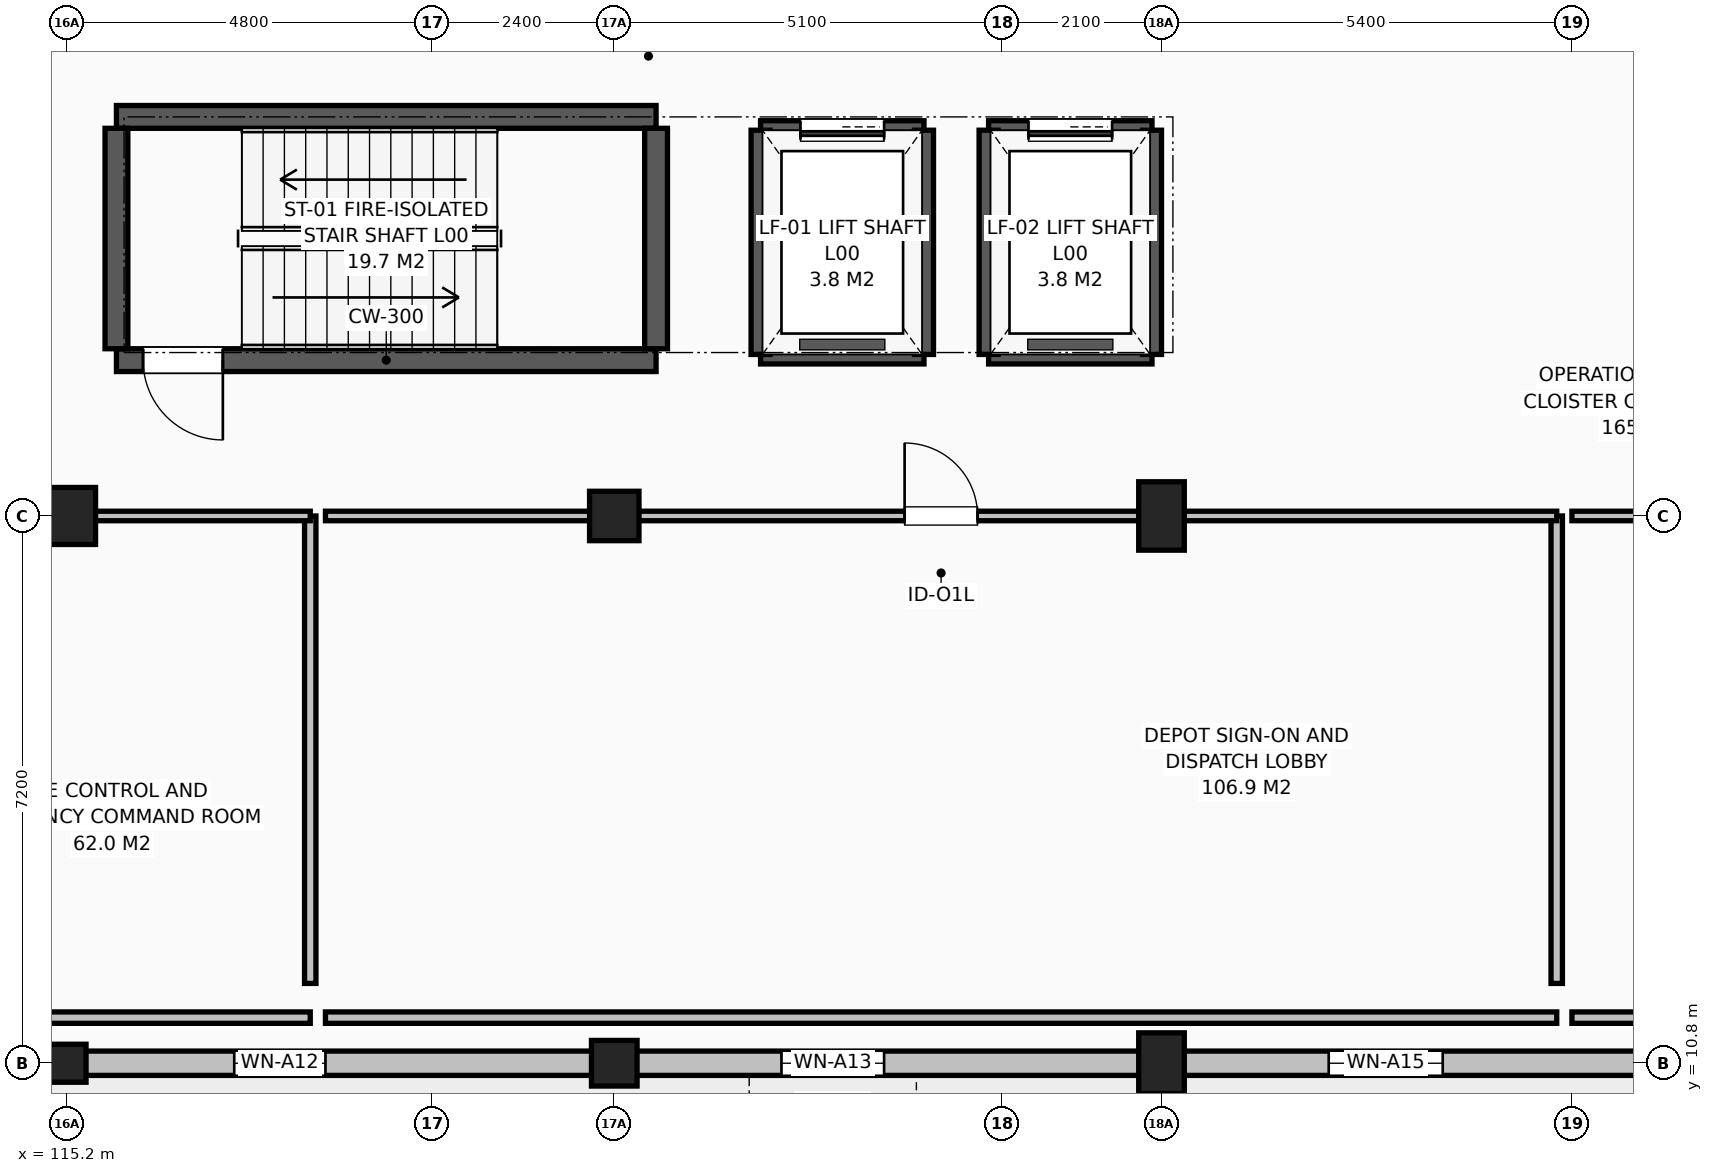
"""IFC4 building model, lengths in metres.
Left out: names, types, materials, properties, quantities, classifications, styles, units other than length and angle.
Written with IfcOpenShell. Run it as: python <this file> out.ifc"""

import sys

from ifc_helpers import new_model, si_unit, direction, frame, frame_2d, origin, origin_2d, place, context, subcontext, project, spatial, rectangle, circle, extrude, element, fill, save


model = new_model("IFC4")
c1 = context("Model", 3, precision=1e-05, world=origin(), true_north=direction((0.0, 1.0)))
c2 = subcontext(c1, "Body", "Model", "MODEL_VIEW")
j1 = project(units=[si_unit("LENGTHUNIT", "METRE"), si_unit("PLANEANGLEUNIT", "RADIAN")], contexts=[c1])
p1 = place(None, origin())
s1 = spatial("IfcSite", under=j1, at=p1, CompositionType="ELEMENT")
p2 = place(p1, origin())
s2 = spatial("IfcBuilding", under=s1, at=p2, CompositionType="ELEMENT")
p3 = place(p2, origin())
s3 = spatial("IfcBuildingStorey", under=s2, at=p3, CompositionType="ELEMENT", Elevation=0.0)
p4 = place(p3, frame((115.2, 10.8, 0.0), z_axis=(0.0, 0.0, 1.0), x_axis=(1.0, 0.0, 0.0)))
e1 = element("IfcColumn", 1, at=p4, inside=s3, PredefinedType="COLUMN", context=c2, shape_type="SweptSolid", body=[
    extrude(circle(Radius=0.25, at=origin_2d()), origin(), (0.0, 0.0, 1.0), 4.8),
])
p5 = place(p3, frame((115.2, 18.0, 0.0), z_axis=(0.0, 0.0, 1.0), x_axis=(1.0, 0.0, 0.0)))
e2 = element("IfcColumn", 2, at=p5, inside=s3, PredefinedType="COLUMN", context=c2, shape_type="SweptSolid", body=[
    extrude(circle(Radius=0.375, at=origin_2d()), origin(), (0.0, 0.0, 1.0), 4.8),
])
p6 = place(p3, frame((122.4, 10.8, 0.0), z_axis=(0.0, 0.0, 1.0), x_axis=(1.0, 0.0, 0.0)))
e3 = element("IfcColumn", 3, at=p6, inside=s3, PredefinedType="COLUMN", context=c2, shape_type="SweptSolid", body=[
    extrude(rectangle(XDim=0.6, YDim=0.6, at=origin_2d()), origin(), (0.0, 0.0, 1.0), 4.8),
])
p7 = place(p3, frame((122.4, 18.0, 0.0), z_axis=(0.0, 0.0, 1.0), x_axis=(1.0, 0.0, 0.0)))
e4 = element("IfcColumn", 4, at=p7, inside=s3, PredefinedType="COLUMN", context=c2, shape_type="SweptSolid", body=[
    extrude(rectangle(XDim=0.65, YDim=0.65, at=origin_2d()), origin(), (0.0, 0.0, 1.0), 4.8),
])
p8 = place(p3, frame((129.6, 10.8, 0.0), z_axis=(0.0, 0.0, 1.0), x_axis=(1.0, 0.0, 0.0)))
e5 = element("IfcColumn", 5, at=p8, inside=s3, PredefinedType="COLUMN", context=c2, shape_type="SweptSolid", body=[
    extrude(rectangle(XDim=0.6, YDim=0.8, at=origin_2d()), origin(), (0.0, 0.0, 1.0), 4.8),
])
p9 = place(p3, frame((129.6, 18.0, 0.0), z_axis=(0.0, 0.0, 1.0), x_axis=(1.0, 0.0, 0.0)))
e6 = element("IfcColumn", 6, at=p9, inside=s3, PredefinedType="COLUMN", context=c2, shape_type="SweptSolid", body=[
    extrude(rectangle(XDim=0.6, YDim=0.9, at=origin_2d()), origin(), (0.0, 0.0, 1.0), 4.8),
])
p10 = place(p3, frame((108.0, 10.8, 0.0), z_axis=(0.0, 0.0, 1.0), x_axis=(1.0, 0.0, 0.0)))
e7 = element("IfcWall", 7, at=p10, inside=s3, PredefinedType="SOLIDWALL", context=c2, shape_type="SweptSolid", body=[
    extrude(rectangle(XDim=79.2, YDim=0.32, at=frame_2d((39.6, 0.0))), origin(), (0.0, 0.0, 1.0), 4.25),
])
p11 = place(p10, frame((2.2, 0.0, 0.72)))
e8 = element("IfcOpeningElement", 8, at=p11, cuts=e7, PredefinedType="OPENING", context=c2, shape_type="SweptSolid", body=[
    extrude(rectangle(XDim=1.8, YDim=2.15, at=frame_2d((0.9, 1.075))), frame((0.0, 0.17, 0.0), z_axis=(0.0, -1.0, 0.0), x_axis=(1.0, 0.0, 0.0)), (0.0, 0.0, 1.0), 0.34),
])
p12 = place(p10, frame((9.4, 0.0, 0.72)))
e9 = element("IfcOpeningElement", 9, at=p12, cuts=e7, PredefinedType="OPENING", context=c2, shape_type="SweptSolid", body=[
    extrude(rectangle(XDim=1.2, YDim=2.0, at=frame_2d((0.6, 1.0))), frame((0.0, 0.17, 0.0), z_axis=(0.0, -1.0, 0.0), x_axis=(1.0, 0.0, 0.0)), (0.0, 0.0, 1.0), 0.34),
])
p13 = place(p10, frame((16.6, 0.0, 0.72)))
e10 = element("IfcOpeningElement", 10, at=p13, cuts=e7, PredefinedType="OPENING", context=c2, shape_type="SweptSolid", body=[
    extrude(rectangle(XDim=1.35, YDim=2.05, at=frame_2d((0.675, 1.025))), frame((0.0, 0.17, 0.0), z_axis=(0.0, -1.0, 0.0), x_axis=(1.0, 0.0, 0.0)), (0.0, 0.0, 1.0), 0.34),
])
p14 = place(p10, frame((23.8, 0.0, 0.72)))
e11 = element("IfcOpeningElement", 11, at=p14, cuts=e7, PredefinedType="OPENING", context=c2, shape_type="SweptSolid", body=[
    extrude(rectangle(XDim=1.5, YDim=2.1, at=frame_2d((0.75, 1.05))), frame((0.0, 0.17, 0.0), z_axis=(0.0, -1.0, 0.0), x_axis=(1.0, 0.0, 0.0)), (0.0, 0.0, 1.0), 0.34),
])
p15 = place(p10, frame((31.0, 0.0, 0.72)))
e12 = element("IfcOpeningElement", 12, at=p15, cuts=e7, PredefinedType="OPENING", context=c2, shape_type="SweptSolid", body=[
    extrude(rectangle(XDim=1.65, YDim=2.1, at=frame_2d((0.825, 1.05))), frame((0.0, 0.17, 0.0), z_axis=(0.0, -1.0, 0.0), x_axis=(1.0, 0.0, 0.0)), (0.0, 0.0, 1.0), 0.34),
])
p16 = place(p10, frame((38.2, 0.0, 0.72)))
e13 = element("IfcOpeningElement", 13, at=p16, cuts=e7, PredefinedType="OPENING", context=c2, shape_type="SweptSolid", body=[
    extrude(rectangle(XDim=1.8, YDim=2.15, at=frame_2d((0.9, 1.075))), frame((0.0, 0.17, 0.0), z_axis=(0.0, -1.0, 0.0), x_axis=(1.0, 0.0, 0.0)), (0.0, 0.0, 1.0), 0.34),
])
p17 = place(p10, frame((45.4, 0.0, 0.72)))
e14 = element("IfcOpeningElement", 14, at=p17, cuts=e7, PredefinedType="OPENING", context=c2, shape_type="SweptSolid", body=[
    extrude(rectangle(XDim=1.2, YDim=2.0, at=frame_2d((0.6, 1.0))), frame((0.0, 0.17, 0.0), z_axis=(0.0, -1.0, 0.0), x_axis=(1.0, 0.0, 0.0)), (0.0, 0.0, 1.0), 0.34),
])
p18 = place(p10, frame((52.6, 0.0, 0.72)))
e15 = element("IfcOpeningElement", 15, at=p18, cuts=e7, PredefinedType="OPENING", context=c2, shape_type="SweptSolid", body=[
    extrude(rectangle(XDim=1.35, YDim=2.05, at=frame_2d((0.675, 1.025))), frame((0.0, 0.17, 0.0), z_axis=(0.0, -1.0, 0.0), x_axis=(1.0, 0.0, 0.0)), (0.0, 0.0, 1.0), 0.34),
])
p19 = place(p10, frame((59.8, 0.0, 0.72)))
e16 = element("IfcOpeningElement", 16, at=p19, cuts=e7, PredefinedType="OPENING", context=c2, shape_type="SweptSolid", body=[
    extrude(rectangle(XDim=1.5, YDim=2.1, at=frame_2d((0.75, 1.05))), frame((0.0, 0.17, 0.0), z_axis=(0.0, -1.0, 0.0), x_axis=(1.0, 0.0, 0.0)), (0.0, 0.0, 1.0), 0.34),
])
p20 = place(p10, frame((67.0, 0.0, 0.72)))
e17 = element("IfcOpeningElement", 17, at=p20, cuts=e7, PredefinedType="OPENING", context=c2, shape_type="SweptSolid", body=[
    extrude(rectangle(XDim=1.65, YDim=2.1, at=frame_2d((0.825, 1.05))), frame((0.0, 0.17, 0.0), z_axis=(0.0, -1.0, 0.0), x_axis=(1.0, 0.0, 0.0)), (0.0, 0.0, 1.0), 0.34),
])
p21 = place(p3, frame((115.85, 20.05, 0.0), z_axis=(0.0, 0.0, 1.0), x_axis=(1.0, 0.0, 0.0)))
e18 = element("IfcWall", 18, at=p21, inside=s3, PredefinedType="SHEAR", context=c2, shape_type="SweptSolid", body=[
    extrude(rectangle(XDim=7.1, YDim=0.3, at=frame_2d((3.55, 0.0))), origin(), (0.0, 0.0, 1.0), 4.525),
])
p22 = place(p21, frame((0.35, 0.0, 0.0)))
e19 = element("IfcOpeningElement", 19, at=p22, cuts=e18, PredefinedType="OPENING", context=c2, shape_type="SweptSolid", body=[
    extrude(rectangle(XDim=1.05, YDim=2.15, at=frame_2d((0.525, 1.075))), frame((0.0, 0.16, 0.0), z_axis=(0.0, -1.0, 0.0), x_axis=(1.0, 0.0, 0.0)), (0.0, 0.0, 1.0), 0.32),
])
p23 = place(p3, frame((122.95, 23.25, 0.0), z_axis=(0.0, 0.0, 1.0), x_axis=(-1.0, 0.0, 0.0)))
e20 = element("IfcWall", 20, at=p23, inside=s3, PredefinedType="SHEAR", context=c2, shape_type="SweptSolid", body=[
    extrude(rectangle(XDim=7.1, YDim=0.3, at=frame_2d((3.55, 0.0))), origin(), (0.0, 0.0, 1.0), 4.525),
])
for number, where, z_axis, x_axis in (
    (21, (122.95, 20.2, 0.0), (0.0, 0.0, 1.0), (0.0, 1.0, 0.0)),
    (22, (115.85, 23.1, 0.0), (0.0, 0.0, 1.0), (0.0, -1.0, 0.0)),
):
    element("IfcWall", number, at=place(p3, frame(where, z_axis=z_axis, x_axis=x_axis)), inside=s3, PredefinedType="SHEAR", context=c2, shape_type="SweptSolid", body=[
        extrude(rectangle(XDim=2.9, YDim=0.3, at=frame_2d((1.45, 0.0))), origin(), (0.0, 0.0, 1.0), 4.525),
    ])
p24 = place(p3, frame((124.325, 20.125, 0.0), z_axis=(0.0, 0.0, 1.0), x_axis=(1.0, 0.0, 0.0)))
e23 = element("IfcWall", 23, at=p24, inside=s3, PredefinedType="SHEAR", context=c2, shape_type="SweptSolid", body=[
    extrude(rectangle(XDim=2.15, YDim=0.25, at=frame_2d((1.075, 0.0))), origin(), (0.0, 0.0, 1.0), 4.5),
])
p25 = place(p3, frame((126.475, 23.075, 0.0), z_axis=(0.0, 0.0, 1.0), x_axis=(-1.0, 0.0, 0.0)))
e24 = element("IfcWall", 24, at=p25, inside=s3, PredefinedType="SHEAR", context=c2, shape_type="SweptSolid", body=[
    extrude(rectangle(XDim=2.15, YDim=0.25, at=frame_2d((1.075, 0.0))), origin(), (0.0, 0.0, 1.0), 4.5),
])
p26 = place(p25, frame((0.525, 0.0, 0.0)))
e25 = element("IfcOpeningElement", 25, at=p26, cuts=e24, PredefinedType="OPENING", context=c2, shape_type="SweptSolid", body=[
    extrude(rectangle(XDim=1.1, YDim=2.15, at=frame_2d((0.55, 1.075))), frame((0.0, 0.135, 0.0), z_axis=(0.0, -1.0, 0.0), x_axis=(1.0, 0.0, 0.0)), (0.0, 0.0, 1.0), 0.27),
])
for number, where, z_axis, x_axis in (
    (26, (124.325, 23.075, 0.0), (0.0, 0.0, 1.0), (0.0, -1.0, 0.0)),
    (27, (126.475, 20.125, 0.0), (0.0, 0.0, 1.0), (0.0, 1.0, 0.0)),
):
    element("IfcWall", number, at=place(p3, frame(where, z_axis=z_axis, x_axis=x_axis)), inside=s3, PredefinedType="SHEAR", context=c2, shape_type="SweptSolid", body=[
        extrude(rectangle(XDim=2.95, YDim=0.25, at=frame_2d((1.475, 0.0))), origin(), (0.0, 0.0, 1.0), 4.5),
    ])
p27 = place(p3, frame((127.325, 20.125, 0.0), z_axis=(0.0, 0.0, 1.0), x_axis=(1.0, 0.0, 0.0)))
e28 = element("IfcWall", 28, at=p27, inside=s3, PredefinedType="SHEAR", context=c2, shape_type="SweptSolid", body=[
    extrude(rectangle(XDim=2.15, YDim=0.25, at=frame_2d((1.075, 0.0))), origin(), (0.0, 0.0, 1.0), 4.5),
])
p28 = place(p3, frame((129.475, 23.075, 0.0), z_axis=(0.0, 0.0, 1.0), x_axis=(-1.0, 0.0, 0.0)))
e29 = element("IfcWall", 29, at=p28, inside=s3, PredefinedType="SHEAR", context=c2, shape_type="SweptSolid", body=[
    extrude(rectangle(XDim=2.15, YDim=0.25, at=frame_2d((1.075, 0.0))), origin(), (0.0, 0.0, 1.0), 4.5),
])
p29 = place(p28, frame((0.525, 0.0, 0.0)))
e30 = element("IfcOpeningElement", 30, at=p29, cuts=e29, PredefinedType="OPENING", context=c2, shape_type="SweptSolid", body=[
    extrude(rectangle(XDim=1.1, YDim=2.15, at=frame_2d((0.55, 1.075))), frame((0.0, 0.135, 0.0), z_axis=(0.0, -1.0, 0.0), x_axis=(1.0, 0.0, 0.0)), (0.0, 0.0, 1.0), 0.27),
])
for number, where, z_axis, x_axis in (
    (31, (127.325, 23.075, 0.0), (0.0, 0.0, 1.0), (0.0, -1.0, 0.0)),
    (32, (129.475, 20.125, 0.0), (0.0, 0.0, 1.0), (0.0, 1.0, 0.0)),
):
    element("IfcWall", number, at=place(p3, frame(where, z_axis=z_axis, x_axis=x_axis)), inside=s3, PredefinedType="SHEAR", context=c2, shape_type="SweptSolid", body=[
        extrude(rectangle(XDim=2.95, YDim=0.25, at=frame_2d((1.475, 0.0))), origin(), (0.0, 0.0, 1.0), 4.5),
    ])
p30 = place(p3, frame((118.4, 11.4, 0.0), z_axis=(0.0, 0.0, 1.0), x_axis=(-1.0, 0.0, 0.0)))
e33 = element("IfcWall", 33, at=p30, inside=s3, PredefinedType="PARTITIONING", context=c2, shape_type="SweptSolid", body=[
    extrude(rectangle(XDim=9.4, YDim=0.15, at=frame_2d((4.7, 0.0))), origin(), (0.0, 0.0, 1.0), 3.857),
])
p31 = place(p3, frame((118.4, 11.85, 0.0), z_axis=(0.0, 0.0, 1.0), x_axis=(0.0, 1.0, 0.0)))
e34 = element("IfcWall", 34, at=p31, inside=s3, PredefinedType="PARTITIONING", context=c2, shape_type="SweptSolid", body=[
    extrude(rectangle(XDim=6.15, YDim=0.15, at=frame_2d((3.075, 0.0))), origin(), (0.0, 0.0, 1.0), 3.857),
])
p32 = place(p3, frame((109.0, 18.0, 0.0), z_axis=(0.0, 0.0, 1.0), x_axis=(1.0, 0.0, 0.0)))
e35 = element("IfcWall", 35, at=p32, inside=s3, PredefinedType="PARTITIONING", context=c2, shape_type="SweptSolid", body=[
    extrude(rectangle(XDim=9.4, YDim=0.125, at=frame_2d((4.7, 0.0))), origin(), (0.0, 0.0, 1.0), 3.857),
])
p33 = place(p32, frame((4.215, 0.0, 0.0)))
e36 = element("IfcOpeningElement", 36, at=p33, cuts=e35, PredefinedType="OPENING", context=c2, shape_type="SweptSolid", body=[
    extrude(rectangle(XDim=0.97, YDim=2.15, at=frame_2d((0.485, 1.075))), frame((0.0, 0.073, 0.0), z_axis=(0.0, -1.0, 0.0), x_axis=(1.0, 0.0, 0.0)), (0.0, 0.0, 1.0), 0.145),
])
p34 = place(p3, frame((134.8, 11.4, 0.0), z_axis=(0.0, 0.0, 1.0), x_axis=(-1.0, 0.0, 0.0)))
e37 = element("IfcWall", 37, at=p34, inside=s3, PredefinedType="PARTITIONING", context=c2, shape_type="SweptSolid", body=[
    extrude(rectangle(XDim=16.2, YDim=0.15, at=frame_2d((8.1, 0.0))), origin(), (0.0, 0.0, 1.0), 3.557),
])
p35 = place(p3, frame((134.8, 11.85, 0.0), z_axis=(0.0, 0.0, 1.0), x_axis=(0.0, 1.0, 0.0)))
e38 = element("IfcWall", 38, at=p35, inside=s3, PredefinedType="PARTITIONING", context=c2, shape_type="SweptSolid", body=[
    extrude(rectangle(XDim=6.15, YDim=0.15, at=frame_2d((3.075, 0.0))), origin(), (0.0, 0.0, 1.0), 3.757),
])
p36 = place(p3, frame((118.6, 18.0, 0.0), z_axis=(0.0, 0.0, 1.0), x_axis=(1.0, 0.0, 0.0)))
e39 = element("IfcWall", 39, at=p36, inside=s3, PredefinedType="PARTITIONING", context=c2, shape_type="SweptSolid", body=[
    extrude(rectangle(XDim=16.2, YDim=0.125, at=frame_2d((8.1, 0.0))), origin(), (0.0, 0.0, 1.0), 3.757),
])
p37 = place(p36, frame((7.62, 0.0, 0.0)))
e40 = element("IfcOpeningElement", 40, at=p37, cuts=e39, PredefinedType="OPENING", context=c2, shape_type="SweptSolid", body=[
    extrude(rectangle(XDim=0.96, YDim=2.15, at=frame_2d((0.48, 1.075))), frame((0.0, 0.073, 0.0), z_axis=(0.0, -1.0, 0.0), x_axis=(1.0, 0.0, 0.0)), (0.0, 0.0, 1.0), 0.145),
])
p38 = place(p3, frame((154.0, 11.4, 0.0), z_axis=(0.0, 0.0, 1.0), x_axis=(-1.0, 0.0, 0.0)))
e41 = element("IfcWall", 41, at=p38, inside=s3, PredefinedType="PARTITIONING", context=c2, shape_type="SweptSolid", body=[
    extrude(rectangle(XDim=19.0, YDim=0.15, at=frame_2d((9.5, 0.0))), origin(), (0.0, 0.0, 1.0), 3.857),
])
p39 = place(p3, frame((135.0, 18.0, 0.0), z_axis=(0.0, 0.0, 1.0), x_axis=(1.0, 0.0, 0.0)))
e42 = element("IfcWall", 42, at=p39, inside=s3, PredefinedType="PARTITIONING", context=c2, shape_type="SweptSolid", body=[
    extrude(rectangle(XDim=19.0, YDim=0.125, at=frame_2d((9.5, 0.0))), origin(), (0.0, 0.0, 1.0), 3.657),
])
p40 = place(p39, frame((5.16, 0.0, 0.0)))
e43 = element("IfcOpeningElement", 43, at=p40, cuts=e42, PredefinedType="OPENING", context=c2, shape_type="SweptSolid", body=[
    extrude(rectangle(XDim=1.8, YDim=2.2, at=frame_2d((0.9, 1.1))), frame((0.0, 0.073, 0.0), z_axis=(0.0, -1.0, 0.0), x_axis=(1.0, 0.0, 0.0)), (0.0, 0.0, 1.0), 0.145),
])
p41 = place(p12, origin())
e44 = element("IfcWindow", 44, at=p41, inside=s3, PartitioningType="SINGLE_PANEL", PredefinedType="WINDOW", context=c2, shape_type="SweptSolid", body=[
    extrude(rectangle(XDim=1.2, YDim=2.0, at=frame_2d((0.6, 1.0))), frame((0.0, 0.03, 0.0), z_axis=(0.0, -1.0, 0.0), x_axis=(1.0, 0.0, 0.0)), (0.0, 0.0, 1.0), 0.06),
])
fill(e9, e44)
p42 = place(p13, origin())
e45 = element("IfcWindow", 45, at=p42, inside=s3, PartitioningType="SINGLE_PANEL", PredefinedType="WINDOW", context=c2, shape_type="SweptSolid", body=[
    extrude(rectangle(XDim=1.35, YDim=2.05, at=frame_2d((0.675, 1.025))), frame((0.0, 0.03, 0.0), z_axis=(0.0, -1.0, 0.0), x_axis=(1.0, 0.0, 0.0)), (0.0, 0.0, 1.0), 0.06),
])
fill(e10, e45)
p43 = place(p14, origin())
e46 = element("IfcWindow", 46, at=p43, inside=s3, PartitioningType="SINGLE_PANEL", PredefinedType="WINDOW", context=c2, shape_type="SweptSolid", body=[
    extrude(rectangle(XDim=1.5, YDim=2.1, at=frame_2d((0.75, 1.05))), frame((0.0, 0.03, 0.0), z_axis=(0.0, -1.0, 0.0), x_axis=(1.0, 0.0, 0.0)), (0.0, 0.0, 1.0), 0.06),
])
fill(e11, e46)
p44 = place(p22, frame((1.05, 0.0, 0.0), z_axis=(0.0, 0.0, 1.0), x_axis=(-1.0, 0.0, 0.0)))
e47 = element("IfcDoor", 47, at=p44, inside=s3, OperationType="SINGLE_SWING_LEFT", PredefinedType="DOOR", context=c2, shape_type="SweptSolid", body=[
    extrude(rectangle(XDim=1.05, YDim=2.15, at=frame_2d((0.525, 1.075))), frame((0.0, 0.025, 0.0), z_axis=(0.0, -1.0, 0.0), x_axis=(1.0, 0.0, 0.0)), (0.0, 0.0, 1.0), 0.05),
])
fill(e19, e47)
p45 = place(p26, origin())
e48 = element("IfcDoor", 48, at=p45, inside=s3, OperationType="SLIDING_TO_LEFT", PredefinedType="DOOR", context=c2, shape_type="SweptSolid", body=[
    extrude(rectangle(XDim=1.1, YDim=2.15, at=frame_2d((0.55, 1.075))), frame((0.0, 0.025, 0.0), z_axis=(0.0, -1.0, 0.0), x_axis=(1.0, 0.0, 0.0)), (0.0, 0.0, 1.0), 0.05),
])
fill(e25, e48)
p46 = place(p29, origin())
e49 = element("IfcDoor", 49, at=p46, inside=s3, OperationType="SLIDING_TO_LEFT", PredefinedType="DOOR", context=c2, shape_type="SweptSolid", body=[
    extrude(rectangle(XDim=1.1, YDim=2.15, at=frame_2d((0.55, 1.075))), frame((0.0, 0.025, 0.0), z_axis=(0.0, -1.0, 0.0), x_axis=(1.0, 0.0, 0.0)), (0.0, 0.0, 1.0), 0.05),
])
fill(e30, e49)
p47 = place(p37, origin())
e50 = element("IfcDoor", 50, at=p47, inside=s3, OperationType="SINGLE_SWING_LEFT", PredefinedType="DOOR", context=c2, shape_type="SweptSolid", body=[
    extrude(rectangle(XDim=0.96, YDim=2.15, at=frame_2d((0.48, 1.075))), frame((0.0, 0.025, 0.0), z_axis=(0.0, -1.0, 0.0), x_axis=(1.0, 0.0, 0.0)), (0.0, 0.0, 1.0), 0.05),
])
fill(e40, e50)
save(model, sys.argv[1])
